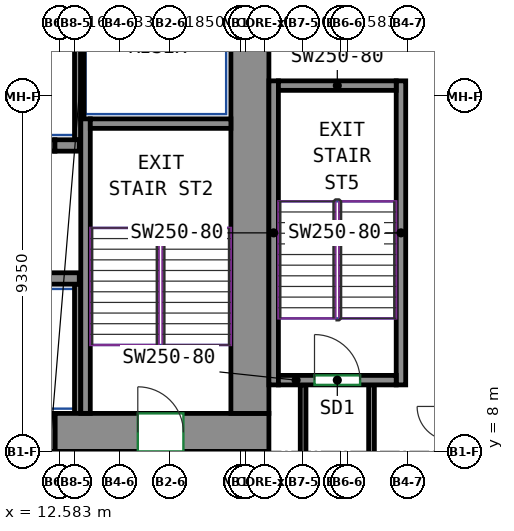
"""IFC4 building model, lengths in metres.
Left out: names, types, materials, properties, quantities, classifications, styles, units other than length and angle.
Written with IfcOpenShell. Run it as: python <this file> out.ifc"""

import sys

from ifc_helpers import new_model, si_unit, direction, frame, frame_2d, origin, place, context, subcontext, project, spatial, rectangle, extrude, source, transform, mapped, element, fill, save


model = new_model("IFC4")
c1 = context("Model", 3, precision=1e-05, world=origin(), true_north=direction((0.0, 1.0)))
c2 = subcontext(c1, "Body", "Model", "MODEL_VIEW")
j1 = project(units=[si_unit("LENGTHUNIT", "METRE"), si_unit("PLANEANGLEUNIT", "RADIAN")], contexts=[c1])
p1 = place(None, origin())
s1 = spatial("IfcSite", under=j1, at=p1, CompositionType="ELEMENT")
p2 = place(p1, origin())
s2 = spatial("IfcBuilding", under=s1, at=p2, CompositionType="ELEMENT")
p3 = place(p2, frame((0.0, 0.0, 39.0)))
s3 = spatial("IfcBuildingStorey", under=s2, at=p3, CompositionType="ELEMENT", Elevation=39.0)
m1 = source(origin(), c2, "Body", "SweptSolid", [
    extrude(rectangle(XDim=5.63, YDim=1.0, at=frame_2d((2.815, 0.0))), origin(), (0.0, 0.0, 1.0), 3.72),
])
p4 = place(p3, frame((12.47, 8.5, 0.0), z_axis=(0.0, 0.0, 1.0), x_axis=(1.0, 0.0, 0.0)))
e1 = element("IfcWall", 1, at=p4, inside=s3, PredefinedType="SHEAR", context=c2, shape_type="MappedRepresentation", body=[
    mapped(m1, transform((0.0, 0.0, 0.0))),
])
p5 = place(p4, frame((2.18, 0.0, 0.0)))
e2 = element("IfcOpeningElement", 2, at=p5, cuts=e1, PredefinedType="OPENING", context=c2, shape_type="SweptSolid", body=[
    extrude(rectangle(XDim=1.2, YDim=2.1, at=frame_2d((0.6, 1.05))), frame((0.0, 0.51, 0.0), z_axis=(0.0, -1.0, 0.0), x_axis=(1.0, 0.0, 0.0)), (0.0, 0.0, 1.0), 1.02),
])
m2 = source(origin(), c2, "Body", "SweptSolid", [
    extrude(rectangle(XDim=12.0, YDim=1.0, at=frame_2d((6.0, 0.0))), origin(), (0.0, 0.0, 1.0), 3.72),
])
p6 = place(p3, frame((17.6, 9.0, 0.0), z_axis=(0.0, 0.0, 1.0), x_axis=(0.0, 1.0, 0.0)))
e3 = element("IfcWall", 3, at=p6, inside=s3, PredefinedType="SHEAR", context=c2, shape_type="MappedRepresentation", body=[
    mapped(m2, transform((0.0, 0.0, 0.0))),
])
m3 = source(origin(), c2, "Body", "SweptSolid", [
    extrude(rectangle(XDim=7.75, YDim=0.25, at=frame_2d((3.875, 0.0))), origin(), (0.0, 0.0, 1.0), 3.72),
])
p7 = place(p3, frame((13.275, 9.0, 0.0), z_axis=(0.0, 0.0, 1.0), x_axis=(0.0, 1.0, 0.0)))
e4 = element("IfcWall", 4, at=p7, inside=s3, PredefinedType="SHEAR", context=c2, shape_type="MappedRepresentation", body=[
    mapped(m3, transform((0.0, 0.0, 0.0))),
])
m4 = source(origin(), c2, "Body", "SweptSolid", [
    extrude(rectangle(XDim=3.7, YDim=0.25, at=frame_2d((1.85, 0.0))), origin(), (0.0, 0.0, 1.0), 3.72),
])
p8 = place(p3, frame((13.4, 16.625, 0.0), z_axis=(0.0, 0.0, 1.0), x_axis=(1.0, 0.0, 0.0)))
e5 = element("IfcWall", 5, at=p8, inside=s3, PredefinedType="SHEAR", context=c2, shape_type="MappedRepresentation", body=[
    mapped(m4, transform((0.0, 0.0, 0.0))),
])
m5 = source(origin(), c2, "Body", "SweptSolid", [
    extrude(rectangle(XDim=8.0, YDim=0.25, at=frame_2d((4.0, 0.0))), origin(), (0.0, 0.0, 1.0), 3.72),
])
for number, where, z_axis, x_axis in (
    (6, (18.225, 9.75, 0.0), (0.0, 0.0, 1.0), (0.0, 1.0, 0.0)),
    (7, (21.575, 9.75, 0.0), (0.0, 0.0, 1.0), (0.0, 1.0, 0.0)),
):
    element("IfcWall", number, at=place(p3, frame(where, z_axis=z_axis, x_axis=x_axis)), inside=s3, PredefinedType="SHEAR", context=c2, shape_type="MappedRepresentation", body=[
        mapped(m5, transform((0.0, 0.0, 0.0))),
    ])
m6 = source(origin(), c2, "Body", "SweptSolid", [
    extrude(rectangle(XDim=3.1, YDim=0.25, at=frame_2d((1.55, 0.0))), origin(), (0.0, 0.0, 1.0), 3.72),
])
p9 = place(p3, frame((18.35, 9.875, 0.0), z_axis=(0.0, 0.0, 1.0), x_axis=(1.0, 0.0, 0.0)))
e8 = element("IfcWall", 8, at=p9, inside=s3, PredefinedType="SHEAR", context=c2, shape_type="MappedRepresentation", body=[
    mapped(m6, transform((0.0, 0.0, 0.0))),
])
p10 = place(p9, frame((0.95, 0.0, 0.0)))
e9 = element("IfcOpeningElement", 9, at=p10, cuts=e8, PredefinedType="OPENING", context=c2, shape_type="SweptSolid", body=[
    extrude(rectangle(XDim=1.2, YDim=2.1, at=frame_2d((0.6, 1.05))), frame((0.0, 0.135, 0.0), z_axis=(0.0, -1.0, 0.0), x_axis=(1.0, 0.0, 0.0)), (0.0, 0.0, 1.0), 0.27),
])
p11 = place(p3, frame((18.35, 17.625, 0.0), z_axis=(0.0, 0.0, 1.0), x_axis=(1.0, 0.0, 0.0)))
e10 = element("IfcWall", 10, at=p11, inside=s3, PredefinedType="SHEAR", context=c2, shape_type="MappedRepresentation", body=[
    mapped(m6, transform((0.0, 0.0, 0.0))),
])
m7 = source(origin(), c2, "Body", "SweptSolid", [
    extrude(rectangle(XDim=2.82, YDim=0.3, at=frame_2d((1.41, 0.0))), origin(), (0.0, 0.0, 1.0), 3.72),
])
p12 = place(p3, frame((10.29, 12.55, 0.0), z_axis=(0.0, 0.0, 1.0), x_axis=(1.0, 0.0, 0.0)))
e11 = element("IfcWall", 11, at=p12, inside=s3, PredefinedType="SHEAR", context=c2, shape_type="MappedRepresentation", body=[
    mapped(m7, transform((0.0, 0.0, 0.0))),
])
m8 = source(origin(), c2, "Body", "SweptSolid", [
    extrude(rectangle(XDim=0.64, YDim=0.3, at=frame_2d((0.32, 0.0))), origin(), (0.0, 0.0, 1.0), 3.72),
])
p13 = place(p3, frame((12.47, 16.05, 0.0), z_axis=(0.0, 0.0, 1.0), x_axis=(1.0, 0.0, 0.0)))
e12 = element("IfcWall", 12, at=p13, inside=s3, PredefinedType="SHEAR", context=c2, shape_type="MappedRepresentation", body=[
    mapped(m8, transform((0.0, 0.0, 0.0))),
])
m9 = source(origin(), c2, "Body", "SweptSolid", [
    extrude(rectangle(XDim=1.4, YDim=0.3, at=frame_2d((0.7, 0.0))), origin(), (0.0, 0.0, 1.0), 3.72),
])
p14 = place(p3, frame((11.07, 16.05, 0.0), z_axis=(0.0, 0.0, 1.0), x_axis=(1.0, 0.0, 0.0)))
e13 = element("IfcWall", 13, at=p14, inside=s3, PredefinedType="PARTITIONING", context=c2, shape_type="MappedRepresentation", body=[
    mapped(m9, transform((0.0, 0.0, 0.0))),
])
p15 = place(p14, frame((0.15, 0.0, 0.0)))
e14 = element("IfcOpeningElement", 14, at=p15, cuts=e13, PredefinedType="OPENING", context=c2, shape_type="SweptSolid", body=[
    extrude(rectangle(XDim=1.1, YDim=2.1, at=frame_2d((0.55, 1.05))), frame((0.0, 0.16, 0.0), z_axis=(0.0, -1.0, 0.0), x_axis=(1.0, 0.0, 0.0)), (0.0, 0.0, 1.0), 0.32),
])
m10 = source(origin(), c2, "Body", "SweptSolid", [
    extrude(rectangle(XDim=3.275, YDim=0.165, at=frame_2d((1.638, 0.0))), origin(), (0.0, 0.0, 1.0), 3.72),
])
p16 = place(p3, frame((13.067, 16.2, 0.0), z_axis=(0.0, 0.0, 1.0), x_axis=(0.0, 1.0, 0.0)))
e15 = element("IfcWall", 15, at=p16, inside=s3, PredefinedType="PARTITIONING", context=c2, shape_type="MappedRepresentation", body=[
    mapped(m10, transform((0.0, 0.0, 0.0))),
])
m11 = source(origin(), c2, "Body", "SweptSolid", [
    extrude(rectangle(XDim=2.725, YDim=0.085, at=frame_2d((1.363, 0.0))), origin(), (0.0, 0.0, 1.0), 3.72),
])
p17 = place(p3, frame((13.192, 16.75, 0.0), z_axis=(0.0, 0.0, 1.0), x_axis=(0.0, 1.0, 0.0)))
e16 = element("IfcWall", 16, at=p17, inside=s3, PredefinedType="PARTITIONING", context=c2, shape_type="MappedRepresentation", body=[
    mapped(m11, transform((0.0, 0.0, 0.0))),
])
m12 = source(origin(), c2, "Body", "SweptSolid", [
    extrude(rectangle(XDim=3.4, YDim=0.165, at=frame_2d((1.7, 0.0))), origin(), (0.0, 0.0, 1.0), 3.72),
])
p18 = place(p3, frame((13.067, 9.0, 0.0), z_axis=(0.0, 0.0, 1.0), x_axis=(0.0, 1.0, 0.0)))
e17 = element("IfcWall", 17, at=p18, inside=s3, PredefinedType="PARTITIONING", context=c2, shape_type="MappedRepresentation", body=[
    mapped(m12, transform((0.0, 0.0, 0.0))),
])
m13 = source(origin(), c2, "Body", "SweptSolid", [
    extrude(rectangle(XDim=1.4, YDim=1.0, at=frame_2d((0.7, 0.0))), origin(), (0.0, 0.0, 1.0), 2.7),
])
p19 = place(p3, frame((11.07, 8.5, 0.0), z_axis=(0.0, 0.0, 1.0), x_axis=(1.0, 0.0, 0.0)))
e18 = element("IfcWall", 18, at=p19, inside=s3, PredefinedType="PARTITIONING", context=c2, shape_type="MappedRepresentation", body=[
    mapped(m13, transform((0.0, 0.0, 0.0))),
])
p20 = place(p19, frame((0.25, 0.0, 0.0)))
e19 = element("IfcOpeningElement", 19, at=p20, cuts=e18, PredefinedType="OPENING", context=c2, shape_type="SweptSolid", body=[
    extrude(rectangle(XDim=0.9, YDim=2.1, at=frame_2d((0.45, 1.05))), frame((0.0, 0.51, 0.0), z_axis=(0.0, -1.0, 0.0), x_axis=(1.0, 0.0, 0.0)), (0.0, 0.0, 1.0), 1.02),
])
p21 = place(p3, frame((19.0, 9.75, 0.0), z_axis=(0.0, 0.0, 1.0), x_axis=(0.0, -1.0, 0.0)))
e20 = element("IfcWall", 20, at=p21, inside=s3, PredefinedType="PARTITIONING", context=c2, shape_type="SweptSolid", body=[
    extrude(rectangle(XDim=6.55, YDim=0.15, at=frame_2d((3.275, 0.0))), origin(), (0.0, 0.0, 1.0), 3.72),
])
p22 = place(p3, frame((20.8, 3.275, 0.0), z_axis=(0.0, 0.0, 1.0), x_axis=(0.0, 1.0, 0.0)))
e21 = element("IfcWall", 21, at=p22, inside=s3, PredefinedType="PARTITIONING", context=c2, shape_type="SweptSolid", body=[
    extrude(rectangle(XDim=6.475, YDim=0.15, at=frame_2d((3.238, 0.0))), origin(), (0.0, 0.0, 1.0), 3.72),
])
p23 = place(p5, origin())
e22 = element("IfcDoor", 22, at=p23, inside=s3, OperationType="DOUBLE_DOOR_SINGLE_SWING", PredefinedType="DOOR", context=c2, shape_type="SweptSolid", body=[
    extrude(rectangle(XDim=1.2, YDim=2.1, at=frame_2d((0.6, 1.05))), frame((0.0, 0.405, 0.0), z_axis=(0.0, -1.0, 0.0), x_axis=(1.0, 0.0, 0.0)), (0.0, 0.0, 1.0), 0.05),
])
fill(e2, e22)
p24 = place(p10, origin())
e23 = element("IfcDoor", 23, at=p24, inside=s3, OperationType="DOUBLE_DOOR_SINGLE_SWING", PredefinedType="DOOR", context=c2, shape_type="SweptSolid", body=[
    extrude(rectangle(XDim=1.2, YDim=2.1, at=frame_2d((0.6, 1.05))), frame((0.0, 0.025, 0.0), z_axis=(0.0, -1.0, 0.0), x_axis=(1.0, 0.0, 0.0)), (0.0, 0.0, 1.0), 0.05),
])
fill(e9, e23)
save(model, sys.argv[1])
